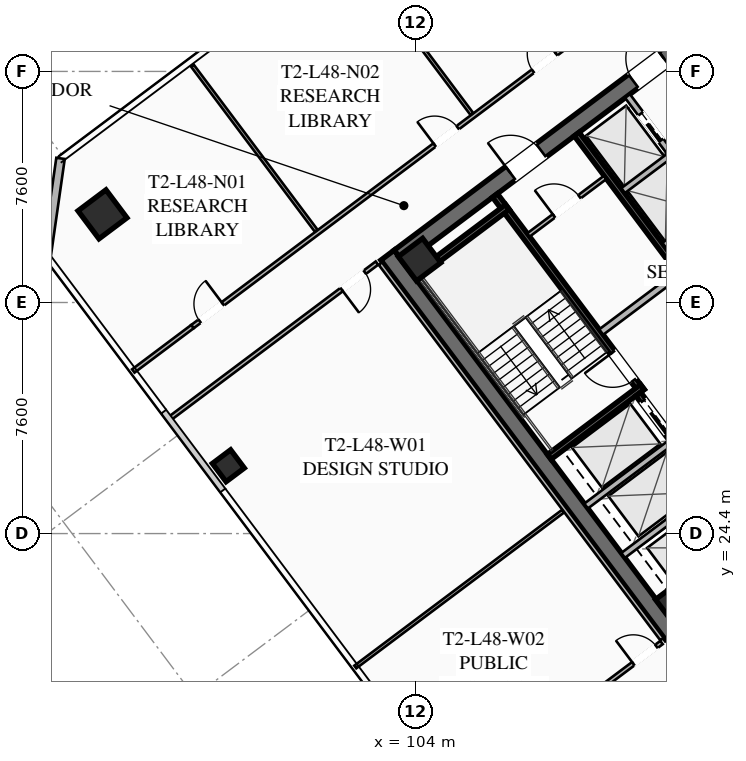
"""IFC4 building model, lengths in metres.
Left out: names, types, materials, properties, quantities, classifications, styles, units other than length and angle.
Written with IfcOpenShell. Run it as: python <this file> out.ifc"""

import sys

from ifc_helpers import new_model, si_unit, direction, frame, frame_2d, origin, origin_2d, place, context, subcontext, project, spatial, rectangle, hollow_rectangle, extrude, element, fill, save


model = new_model("IFC4")
c1 = context("Model", 3, precision=1e-05, world=origin(), true_north=direction((0.0, 1.0)))
c2 = subcontext(c1, "Body", "Model", "MODEL_VIEW")
j1 = project(units=[si_unit("LENGTHUNIT", "METRE"), si_unit("PLANEANGLEUNIT", "RADIAN")], contexts=[c1])
p1 = place(None, origin())
s1 = spatial("IfcSite", under=j1, at=p1, CompositionType="ELEMENT")
p2 = place(p1, origin())
s2 = spatial("IfcBuilding", under=s1, at=p2, CompositionType="ELEMENT")
p3 = place(p2, frame((0.0, 0.0, 178.3)))
s3 = spatial("IfcBuildingStorey", under=s2, at=p3, CompositionType="ELEMENT", Elevation=178.3)
p4 = place(p3, frame((112.436, 21.077, 0.0), z_axis=(0.0, 0.0, 1.0), x_axis=(-0.600005007985, 0.799996243986, 0.0)))
e1 = element("IfcWall", 1, at=p4, inside=s3, PredefinedType="SHEAR", context=c2, shape_type="SweptSolid", body=[
    extrude(rectangle(XDim=15.6, YDim=0.55, at=frame_2d((7.8, 0.0))), origin(), (0.0, 0.0, 1.0), 3.55),
])
p5 = place(p3, frame((103.461, 33.502, 0.0), z_axis=(0.0, 0.0, 1.0), x_axis=(0.799998054672, 0.600002593761, 0.0)))
e2 = element("IfcWall", 2, at=p5, inside=s3, PredefinedType="SHEAR", context=c2, shape_type="SweptSolid", body=[
    extrude(rectangle(XDim=15.06, YDim=0.55, at=frame_2d((7.53, 0.0))), origin(), (0.0, 0.0, 1.0), 3.55),
])
p6 = place(p5, frame((4.58, 0.0, 0.0)))
e3 = element("IfcOpeningElement", 3, at=p6, cuts=e2, PredefinedType="OPENING", context=c2, shape_type="SweptSolid", body=[
    extrude(rectangle(XDim=1.25, YDim=2.25, at=frame_2d((0.625, 1.125))), frame((0.0, 0.285, 0.0), z_axis=(0.0, -1.0, 0.0), x_axis=(1.0, 0.0, 0.0)), (0.0, 0.0, 1.0), 0.57),
])
p7 = place(p5, frame((9.63, 0.0, 0.0)))
e4 = element("IfcOpeningElement", 4, at=p7, cuts=e2, PredefinedType="OPENING", context=c2, shape_type="SweptSolid", body=[
    extrude(rectangle(XDim=1.25, YDim=2.25, at=frame_2d((0.625, 1.125))), frame((0.0, 0.285, 0.0), z_axis=(0.0, -1.0, 0.0), x_axis=(1.0, 0.0, 0.0)), (0.0, 0.0, 1.0), 0.57),
])
for number, where, z_axis, x_axis in (
    (5, (112.59, 22.13, 0.0), (0.0, 0.0, 1.0), (0.8, 0.6, 0.0)),
    (6, (104.13, 33.41, 0.0), (0.0, 0.0, 1.0), (0.8, 0.6, 0.0)),
):
    element("IfcColumn", number, at=place(p3, frame(where, z_axis=z_axis, x_axis=x_axis)), inside=s3, PredefinedType="COLUMN", context=c2, shape_type="SweptSolid", body=[
        extrude(hollow_rectangle(XDim=1.0, YDim=1.0, WallThickness=0.04, at=origin_2d()), origin(), (0.0, 0.0, 1.0), 3.37),
    ])
p8 = place(p3, frame((93.7, 34.9, 0.0), z_axis=(0.0, 0.0, 1.0), x_axis=(0.799999996291, 0.600000004945, 0.0)))
e7 = element("IfcColumn", 7, at=p8, inside=s3, PredefinedType="COLUMN", context=c2, shape_type="SweptSolid", body=[
    extrude(hollow_rectangle(XDim=1.15, YDim=1.15, WallThickness=0.045, at=origin_2d()), origin(), (0.0, 0.0, 1.0), 3.37),
])
p9 = place(p3, frame((97.84, 26.63, 0.0), z_axis=(0.0, 0.0, 1.0), x_axis=(0.799999996291, 0.600000004945, 0.0)))
e8 = element("IfcColumn", 8, at=p9, inside=s3, PredefinedType="COLUMN", context=c2, shape_type="SweptSolid", body=[
    extrude(hollow_rectangle(XDim=0.75, YDim=0.75, WallThickness=0.032, at=origin_2d()), origin(), (0.0, 0.0, 1.0), 3.37),
])
p10 = place(p3, frame((91.86, 33.52, 0.0), z_axis=(0.0, 0.0, 1.0), x_axis=(0.141410847992, 0.989950994782, 0.0)))
e9 = element("IfcWall", 9, at=p10, inside=s3, PredefinedType="SOLIDWALL", context=c2, shape_type="SweptSolid", body=[
    extrude(rectangle(XDim=3.253, YDim=0.28, at=frame_2d((1.626, 0.0))), origin(), (0.0, 0.0, 1.0), 3.37),
])
p11 = place(p3, frame((111.44, 29.08, 0.0), z_axis=(0.0, 0.0, 1.0), x_axis=(-0.59999029481, 0.8000072788, 0.0)))
e10 = element("IfcWall", 10, at=p11, inside=s3, PredefinedType="SHEAR", context=c2, shape_type="SweptSolid", body=[
    extrude(rectangle(XDim=8.05, YDim=0.2, at=frame_2d((4.025, 0.0))), origin(), (0.0, 0.0, 1.0), 3.37),
])
p12 = place(p11, frame((0.45, 0.0, 0.0)))
e11 = element("IfcOpeningElement", 11, at=p12, cuts=e10, PredefinedType="OPENING", context=c2, shape_type="SweptSolid", body=[
    extrude(rectangle(XDim=1.15, YDim=2.2, at=frame_2d((0.575, 1.1))), frame((0.0, 0.11, 0.0), z_axis=(0.0, -1.0, 0.0), x_axis=(1.0, 0.0, 0.0)), (0.0, 0.0, 1.0), 0.22),
])
for number, where, z_axis, x_axis in (
    (12, (108.396, 26.922, 0.0), (0.0, 0.0, 1.0), (0.8, 0.6, 0.0)),
    (13, (103.956, 32.842, 0.0), (0.0, 0.0, 1.0), (0.8, 0.6, 0.0)),
):
    element("IfcWall", number, at=place(p3, frame(where, z_axis=z_axis, x_axis=x_axis)), inside=s3, PredefinedType="SHEAR", context=c2, shape_type="SweptSolid", body=[
        extrude(rectangle(XDim=3.83, YDim=0.2, at=frame_2d((1.915, 0.0))), origin(), (0.0, 0.0, 1.0), 3.37),
    ])
p13 = place(p3, frame((117.998, 25.936, 0.0), z_axis=(0.0, 0.0, 1.0), x_axis=(-0.600002693989, 0.799997979501, 0.0)))
e14 = element("IfcWall", 14, at=p13, inside=s3, PredefinedType="SHEAR", context=c2, shape_type="SweptSolid", body=[
    extrude(rectangle(XDim=14.5, YDim=0.2, at=frame_2d((7.25, 0.0))), origin(), (0.0, 0.0, 1.0), 3.37),
])
p14 = place(p3, frame((110.104, 31.028, 0.0), z_axis=(0.0, 0.0, 1.0), x_axis=(0.800018601094, 0.59997519774, 0.0)))
e15 = element("IfcWall", 15, at=p14, inside=s3, PredefinedType="SOLIDWALL", context=c2, shape_type="SweptSolid", body=[
    extrude(rectangle(XDim=3.15, YDim=0.22, at=frame_2d((1.575, 0.0))), origin(), (0.0, 0.0, 1.0), 2.723),
])
p15 = place(p3, frame((115.19, 23.83, 0.0), z_axis=(0.0, 0.0, 1.0), x_axis=(-0.599993943644, 0.800004542231, 0.0)))
e16 = element("IfcWall", 16, at=p15, inside=s3, PredefinedType="SHEAR", context=c2, shape_type="SweptSolid", body=[
    extrude(rectangle(XDim=6.45, YDim=0.2, at=frame_2d((3.225, 0.0))), origin(), (0.0, 0.0, 1.0), 3.37),
])
p16 = place(p15, frame((4.875, 0.0, 0.0)))
e17 = element("IfcOpeningElement", 17, at=p16, cuts=e16, PredefinedType="OPENING", context=c2, shape_type="SweptSolid", body=[
    extrude(rectangle(XDim=1.3, YDim=2.25, at=frame_2d((0.65, 1.125))), frame((0.0, 0.11, 0.0), z_axis=(0.0, -1.0, 0.0), x_axis=(1.0, 0.0, 0.0)), (0.0, 0.0, 1.0), 0.22),
])
p17 = place(p15, frame((2.875, 0.0, 0.0)))
e18 = element("IfcOpeningElement", 18, at=p17, cuts=e16, PredefinedType="OPENING", context=c2, shape_type="SweptSolid", body=[
    extrude(rectangle(XDim=1.3, YDim=2.25, at=frame_2d((0.65, 1.125))), frame((0.0, 0.11, 0.0), z_axis=(0.0, -1.0, 0.0), x_axis=(1.0, 0.0, 0.0)), (0.0, 0.0, 1.0), 0.22),
])
p18 = place(p15, frame((0.675, 0.0, 0.0)))
e19 = element("IfcOpeningElement", 19, at=p18, cuts=e16, PredefinedType="OPENING", context=c2, shape_type="SweptSolid", body=[
    extrude(rectangle(XDim=1.3, YDim=2.25, at=frame_2d((0.65, 1.125))), frame((0.0, 0.11, 0.0), z_axis=(0.0, -1.0, 0.0), x_axis=(1.0, 0.0, 0.0)), (0.0, 0.0, 1.0), 0.22),
])
for number, where, z_axis, x_axis in (
    (20, (110.826, 23.682, 0.0), (0.0, 0.0, 1.0), (0.8, 0.6, 0.0)),
    (21, (109.608, 25.306, 0.0), (0.0, 0.0, 1.0), (0.8, 0.6, 0.0)),
):
    element("IfcWall", number, at=place(p3, frame(where, z_axis=z_axis, x_axis=x_axis)), inside=s3, PredefinedType="SOLIDWALL", context=c2, shape_type="SweptSolid", body=[
        extrude(rectangle(XDim=3.48, YDim=0.2, at=frame_2d((1.74, 0.0))), origin(), (0.0, 0.0, 1.0), 3.37),
    ])
p19 = place(p3, frame((107.71, 34.22, 0.0), z_axis=(0.0, 0.0, 1.0), x_axis=(0.799981399002, 0.60002480053, 0.0)))
e22 = element("IfcWall", 22, at=p19, inside=s3, PredefinedType="PARTITIONING", context=c2, shape_type="SweptSolid", body=[
    extrude(rectangle(XDim=3.15, YDim=0.135, at=frame_2d((1.575, 0.0))), origin(), (0.0, 0.0, 1.0), 2.723),
])
p20 = place(p19, frame((1.05, 0.0, 0.0)))
e23 = element("IfcOpeningElement", 23, at=p20, cuts=e22, PredefinedType="OPENING", context=c2, shape_type="SweptSolid", body=[
    extrude(rectangle(XDim=1.05, YDim=2.2, at=frame_2d((0.525, 1.1))), frame((0.0, 0.077, 0.0), z_axis=(0.0, -1.0, 0.0), x_axis=(1.0, 0.0, 0.0)), (0.0, 0.0, 1.0), 0.155),
])
p21 = place(p3, frame((115.11, 33.27, 0.0), z_axis=(0.0, 0.0, 1.0), x_axis=(-0.600011322243, 0.799991508192, 0.0)))
e24 = element("IfcWall", 24, at=p21, inside=s3, PredefinedType="SOLIDWALL", context=c2, shape_type="SweptSolid", body=[
    extrude(rectangle(XDim=6.9, YDim=0.2, at=frame_2d((3.45, 0.0))), origin(), (0.0, 0.0, 1.0), 3.37),
])
p22 = place(p21, frame((0.575, 0.0, 0.0)))
e25 = element("IfcOpeningElement", 25, at=p22, cuts=e24, PredefinedType="OPENING", context=c2, shape_type="SweptSolid", body=[
    extrude(rectangle(XDim=1.1, YDim=2.2, at=frame_2d((0.55, 1.1))), frame((0.0, 0.11, 0.0), z_axis=(0.0, -1.0, 0.0), x_axis=(1.0, 0.0, 0.0)), (0.0, 0.0, 1.0), 0.22),
])
p23 = place(p21, frame((2.825, 0.0, 0.0)))
e26 = element("IfcOpeningElement", 26, at=p23, cuts=e24, PredefinedType="OPENING", context=c2, shape_type="SweptSolid", body=[
    extrude(rectangle(XDim=1.1, YDim=2.2, at=frame_2d((0.55, 1.1))), frame((0.0, 0.11, 0.0), z_axis=(0.0, -1.0, 0.0), x_axis=(1.0, 0.0, 0.0)), (0.0, 0.0, 1.0), 0.22),
])
p24 = place(p21, frame((5.075, 0.0, 0.0)))
e27 = element("IfcOpeningElement", 27, at=p24, cuts=e24, PredefinedType="OPENING", context=c2, shape_type="SweptSolid", body=[
    extrude(rectangle(XDim=1.1, YDim=2.2, at=frame_2d((0.55, 1.1))), frame((0.0, 0.11, 0.0), z_axis=(0.0, -1.0, 0.0), x_axis=(1.0, 0.0, 0.0)), (0.0, 0.0, 1.0), 0.22),
])
p25 = place(p3, frame((112.176, 33.882, 0.0), z_axis=(0.0, 0.0, 1.0), x_axis=(0.8, 0.6, 0.0)))
e28 = element("IfcWall", 28, at=p25, inside=s3, PredefinedType="SOLIDWALL", context=c2, shape_type="SweptSolid", body=[
    extrude(rectangle(XDim=1.88, YDim=0.2, at=frame_2d((0.94, 0.0))), origin(), (0.0, 0.0, 1.0), 3.37),
])
p26 = place(p3, frame((110.826, 35.682, 0.0), z_axis=(0.0, 0.0, 1.0), x_axis=(0.799984418148, 0.600020775241, 0.0)))
e29 = element("IfcWall", 29, at=p26, inside=s3, PredefinedType="SOLIDWALL", context=c2, shape_type="SweptSolid", body=[
    extrude(rectangle(XDim=1.88, YDim=0.2, at=frame_2d((0.94, 0.0))), origin(), (0.0, 0.0, 1.0), 3.37),
])
p27 = place(p3, frame((96.658, 31.206, 0.0), z_axis=(0.0, 0.0, 1.0), x_axis=(0.8, 0.6, 0.0)))
e30 = element("IfcWall", 30, at=p27, inside=s3, PredefinedType="PARTITIONING", context=c2, shape_type="SweptSolid", body=[
    extrude(rectangle(XDim=28.7, YDim=0.135, at=frame_2d((14.35, 0.0))), origin(), (0.0, 0.0, 1.0), 2.723),
])
p28 = place(p27, frame((0.3, 0.0, 0.0)))
e31 = element("IfcOpeningElement", 31, at=p28, cuts=e30, PredefinedType="OPENING", context=c2, shape_type="SweptSolid", body=[
    extrude(rectangle(XDim=0.95, YDim=2.05, at=frame_2d((0.475, 1.025))), frame((0.0, 0.077, 0.0), z_axis=(0.0, -1.0, 0.0), x_axis=(1.0, 0.0, 0.0)), (0.0, 0.0, 1.0), 0.155),
])
p29 = place(p27, frame((9.959, 0.0, 0.0)))
e32 = element("IfcOpeningElement", 32, at=p29, cuts=e30, PredefinedType="OPENING", context=c2, shape_type="SweptSolid", body=[
    extrude(rectangle(XDim=0.95, YDim=2.05, at=frame_2d((0.475, 1.025))), frame((0.0, 0.077, 0.0), z_axis=(0.0, -1.0, 0.0), x_axis=(1.0, 0.0, 0.0)), (0.0, 0.0, 1.0), 0.155),
])
p30 = place(p27, frame((14.005, 0.0, 0.0)))
e33 = element("IfcOpeningElement", 33, at=p30, cuts=e30, PredefinedType="OPENING", context=c2, shape_type="SweptSolid", body=[
    extrude(rectangle(XDim=0.95, YDim=2.05, at=frame_2d((0.475, 1.025))), frame((0.0, 0.077, 0.0), z_axis=(0.0, -1.0, 0.0), x_axis=(1.0, 0.0, 0.0)), (0.0, 0.0, 1.0), 0.155),
])
p31 = place(p27, frame((18.049, 0.0, 0.0)))
e34 = element("IfcOpeningElement", 34, at=p31, cuts=e30, PredefinedType="OPENING", context=c2, shape_type="SweptSolid", body=[
    extrude(rectangle(XDim=0.95, YDim=2.05, at=frame_2d((0.475, 1.025))), frame((0.0, 0.077, 0.0), z_axis=(0.0, -1.0, 0.0), x_axis=(1.0, 0.0, 0.0)), (0.0, 0.0, 1.0), 0.155),
])
p32 = place(p27, frame((27.45, 0.0, 0.0)))
e35 = element("IfcOpeningElement", 35, at=p32, cuts=e30, PredefinedType="OPENING", context=c2, shape_type="SweptSolid", body=[
    extrude(rectangle(XDim=0.95, YDim=2.05, at=frame_2d((0.475, 1.025))), frame((0.0, 0.077, 0.0), z_axis=(0.0, -1.0, 0.0), x_axis=(1.0, 0.0, 0.0)), (0.0, 0.0, 1.0), 0.155),
])
p33 = place(p3, frame((94.714, 29.748, 0.0), z_axis=(0.0, 0.0, 1.0), x_axis=(0.799975885537, 0.600032151272, 0.0)))
e36 = element("IfcWall", 36, at=p33, inside=s3, PredefinedType="PARTITIONING", context=c2, shape_type="SweptSolid", body=[
    extrude(rectangle(XDim=2.43, YDim=0.135, at=frame_2d((1.215, 0.0))), origin(), (0.0, 0.0, 1.0), 2.723),
])
p34 = place(p3, frame((100.73, 34.36, 0.0), z_axis=(0.0, 0.0, 1.0), x_axis=(-0.6, 0.8, 0.0)))
e37 = element("IfcWall", 37, at=p34, inside=s3, PredefinedType="PARTITIONING", context=c2, shape_type="SweptSolid", body=[
    extrude(rectangle(XDim=6.78, YDim=0.11, at=frame_2d((3.39, 0.0))), origin(), (0.0, 0.0, 1.0), 2.723),
])
p35 = place(p3, frame((105.85, 38.2, 0.0), z_axis=(0.0, 0.0, 1.0), x_axis=(-0.600005761307, 0.799995678987, 0.0)))
e38 = element("IfcWall", 38, at=p35, inside=s3, PredefinedType="PARTITIONING", context=c2, shape_type="SweptSolid", body=[
    extrude(rectangle(XDim=6.78, YDim=0.11, at=frame_2d((3.39, 0.0))), origin(), (0.0, 0.0, 1.0), 2.723),
])
p36 = place(p3, frame((131.78, 32.21, 0.0), z_axis=(0.0, 0.0, 1.0), x_axis=(-0.8, -0.6, 0.0)))
e39 = element("IfcWall", 39, at=p36, inside=s3, PredefinedType="PARTITIONING", context=c2, shape_type="SweptSolid", body=[
    extrude(rectangle(XDim=28.7, YDim=0.135, at=frame_2d((14.35, 0.0))), origin(), (0.0, 0.0, 1.0), 2.723),
])
p37 = place(p36, frame((27.37, 0.0, 0.0)))
e40 = element("IfcOpeningElement", 40, at=p37, cuts=e39, PredefinedType="OPENING", context=c2, shape_type="SweptSolid", body=[
    extrude(rectangle(XDim=0.95, YDim=2.05, at=frame_2d((0.475, 1.025))), frame((0.0, 0.077, 0.0), z_axis=(0.0, -1.0, 0.0), x_axis=(1.0, 0.0, 0.0)), (0.0, 0.0, 1.0), 0.155),
])
p38 = place(p36, frame((13.592, 0.0, 0.0)))
e41 = element("IfcOpeningElement", 41, at=p38, cuts=e39, PredefinedType="OPENING", context=c2, shape_type="SweptSolid", body=[
    extrude(rectangle(XDim=0.95, YDim=2.05, at=frame_2d((0.475, 1.025))), frame((0.0, 0.077, 0.0), z_axis=(0.0, -1.0, 0.0), x_axis=(1.0, 0.0, 0.0)), (0.0, 0.0, 1.0), 0.155),
])
p39 = place(p36, frame((0.38, 0.0, 0.0)))
e42 = element("IfcOpeningElement", 42, at=p39, cuts=e39, PredefinedType="OPENING", context=c2, shape_type="SweptSolid", body=[
    extrude(rectangle(XDim=0.95, YDim=2.05, at=frame_2d((0.475, 1.025))), frame((0.0, 0.077, 0.0), z_axis=(0.0, -1.0, 0.0), x_axis=(1.0, 0.0, 0.0)), (0.0, 0.0, 1.0), 0.155),
])
p40 = place(p3, frame((112.104, 20.928, 0.0), z_axis=(0.0, 0.0, 1.0), x_axis=(-0.599994940075, 0.800003794918, 0.0)))
e43 = element("IfcWall", 43, at=p40, inside=s3, PredefinedType="PARTITIONING", context=c2, shape_type="SweptSolid", body=[
    extrude(rectangle(XDim=15.44, YDim=0.135, at=frame_2d((7.72, 0.0))), origin(), (0.0, 0.0, 1.0), 2.723),
])
p41 = place(p3, frame((102.728, 33.296, 0.0), z_axis=(0.0, 0.0, 1.0), x_axis=(-0.800013722153, -0.59998170336, 0.0)))
e44 = element("IfcWall", 44, at=p41, inside=s3, PredefinedType="PARTITIONING", context=c2, shape_type="SweptSolid", body=[
    extrude(rectangle(XDim=8.54, YDim=0.135, at=frame_2d((4.27, 0.0))), origin(), (0.0, 0.0, 1.0), 2.723),
])
p42 = place(p41, frame((0.5, 0.0, 0.0)))
e45 = element("IfcOpeningElement", 45, at=p42, cuts=e44, PredefinedType="OPENING", context=c2, shape_type="SweptSolid", body=[
    extrude(rectangle(XDim=0.95, YDim=2.05, at=frame_2d((0.475, 1.025))), frame((0.0, 0.077, 0.0), z_axis=(0.0, -1.0, 0.0), x_axis=(1.0, 0.0, 0.0)), (0.0, 0.0, 1.0), 0.155),
])
p43 = place(p3, frame((105.256, 15.692, 0.0), z_axis=(0.0, 0.0, 1.0), x_axis=(0.799989708052, 0.600013722352, 0.0)))
e46 = element("IfcWall", 46, at=p43, inside=s3, PredefinedType="PARTITIONING", context=c2, shape_type="SweptSolid", body=[
    extrude(rectangle(XDim=8.54, YDim=0.135, at=frame_2d((4.27, 0.0))), origin(), (0.0, 0.0, 1.0), 2.723),
])
p44 = place(p43, frame((7.38, 0.0, 0.0)))
e47 = element("IfcOpeningElement", 47, at=p44, cuts=e46, PredefinedType="OPENING", context=c2, shape_type="SweptSolid", body=[
    extrude(rectangle(XDim=0.95, YDim=2.05, at=frame_2d((0.475, 1.025))), frame((0.0, 0.077, 0.0), z_axis=(0.0, -1.0, 0.0), x_axis=(1.0, 0.0, 0.0)), (0.0, 0.0, 1.0), 0.155),
])
p45 = place(p3, frame((102.016, 20.012, 0.0), z_axis=(0.0, 0.0, 1.0), x_axis=(0.799989708052, 0.600013722352, 0.0)))
e48 = element("IfcWall", 48, at=p45, inside=s3, PredefinedType="PARTITIONING", context=c2, shape_type="SweptSolid", body=[
    extrude(rectangle(XDim=8.54, YDim=0.11, at=frame_2d((4.27, 0.0))), origin(), (0.0, 0.0, 1.0), 2.723),
])
p46 = place(p6, origin())
e49 = element("IfcDoor", 49, at=p46, inside=s3, OperationType="SINGLE_SWING_LEFT", PredefinedType="DOOR", context=c2, shape_type="SweptSolid", body=[
    extrude(rectangle(XDim=1.25, YDim=2.25, at=frame_2d((0.625, 1.125))), frame((0.0, 0.025, 0.0), z_axis=(0.0, -1.0, 0.0), x_axis=(1.0, 0.0, 0.0)), (0.0, 0.0, 1.0), 0.05),
])
fill(e3, e49)
p47 = place(p7, origin())
e50 = element("IfcDoor", 50, at=p47, inside=s3, OperationType="SINGLE_SWING_RIGHT", PredefinedType="DOOR", context=c2, shape_type="SweptSolid", body=[
    extrude(rectangle(XDim=1.25, YDim=2.25, at=frame_2d((0.625, 1.125))), frame((0.0, 0.025, 0.0), z_axis=(0.0, -1.0, 0.0), x_axis=(1.0, 0.0, 0.0)), (0.0, 0.0, 1.0), 0.05),
])
fill(e4, e50)
p48 = place(p12, origin())
e51 = element("IfcDoor", 51, at=p48, inside=s3, OperationType="SINGLE_SWING_RIGHT", PredefinedType="DOOR", context=c2, shape_type="SweptSolid", body=[
    extrude(rectangle(XDim=1.15, YDim=2.2, at=frame_2d((0.575, 1.1))), frame((0.0, 0.025, 0.0), z_axis=(0.0, -1.0, 0.0), x_axis=(1.0, 0.0, 0.0)), (0.0, 0.0, 1.0), 0.05),
])
fill(e11, e51)
p49 = place(p20, origin())
e52 = element("IfcDoor", 52, at=p49, inside=s3, OperationType="SINGLE_SWING_LEFT", PredefinedType="DOOR", context=c2, shape_type="SweptSolid", body=[
    extrude(rectangle(XDim=1.05, YDim=2.2, at=frame_2d((0.525, 1.1))), frame((0.0, 0.025, 0.0), z_axis=(0.0, -1.0, 0.0), x_axis=(1.0, 0.0, 0.0)), (0.0, 0.0, 1.0), 0.05),
])
fill(e23, e52)
p50 = place(p28, origin())
e53 = element("IfcDoor", 53, at=p50, inside=s3, OperationType="SINGLE_SWING_RIGHT", PredefinedType="DOOR", context=c2, shape_type="SweptSolid", body=[
    extrude(rectangle(XDim=0.95, YDim=2.05, at=frame_2d((0.475, 1.025))), frame((0.0, 0.025, 0.0), z_axis=(0.0, -1.0, 0.0), x_axis=(1.0, 0.0, 0.0)), (0.0, 0.0, 1.0), 0.05),
])
fill(e31, e53)
p51 = place(p29, origin())
e54 = element("IfcDoor", 54, at=p51, inside=s3, OperationType="SINGLE_SWING_LEFT", PredefinedType="DOOR", context=c2, shape_type="SweptSolid", body=[
    extrude(rectangle(XDim=0.95, YDim=2.05, at=frame_2d((0.475, 1.025))), frame((0.0, 0.025, 0.0), z_axis=(0.0, -1.0, 0.0), x_axis=(1.0, 0.0, 0.0)), (0.0, 0.0, 1.0), 0.05),
])
fill(e32, e54)
p52 = place(p30, origin())
e55 = element("IfcDoor", 55, at=p52, inside=s3, OperationType="SINGLE_SWING_RIGHT", PredefinedType="DOOR", context=c2, shape_type="SweptSolid", body=[
    extrude(rectangle(XDim=0.95, YDim=2.05, at=frame_2d((0.475, 1.025))), frame((0.0, 0.025, 0.0), z_axis=(0.0, -1.0, 0.0), x_axis=(1.0, 0.0, 0.0)), (0.0, 0.0, 1.0), 0.05),
])
fill(e33, e55)
p53 = place(p42, origin())
e56 = element("IfcDoor", 56, at=p53, inside=s3, OperationType="SINGLE_SWING_RIGHT", PredefinedType="DOOR", context=c2, shape_type="SweptSolid", body=[
    extrude(rectangle(XDim=0.95, YDim=2.05, at=frame_2d((0.475, 1.025))), frame((0.0, 0.025, 0.0), z_axis=(0.0, -1.0, 0.0), x_axis=(1.0, 0.0, 0.0)), (0.0, 0.0, 1.0), 0.05),
])
fill(e45, e56)
p54 = place(p44, origin())
e57 = element("IfcDoor", 57, at=p54, inside=s3, OperationType="SINGLE_SWING_LEFT", PredefinedType="DOOR", context=c2, shape_type="SweptSolid", body=[
    extrude(rectangle(XDim=0.95, YDim=2.05, at=frame_2d((0.475, 1.025))), frame((0.0, 0.025, 0.0), z_axis=(0.0, -1.0, 0.0), x_axis=(1.0, 0.0, 0.0)), (0.0, 0.0, 1.0), 0.05),
])
fill(e47, e57)
p55 = place(p16, origin())
e58 = element("IfcDoor", 58, at=p55, inside=s3, OperationType="SLIDING_TO_LEFT", PredefinedType="DOOR", context=c2, shape_type="SweptSolid", body=[
    extrude(rectangle(XDim=1.3, YDim=2.25, at=frame_2d((0.65, 1.125))), frame((0.0, 0.025, 0.0), z_axis=(0.0, -1.0, 0.0), x_axis=(1.0, 0.0, 0.0)), (0.0, 0.0, 1.0), 0.05),
])
fill(e17, e58)
p56 = place(p24, origin())
e59 = element("IfcDoor", 59, at=p56, inside=s3, OperationType="SLIDING_TO_LEFT", PredefinedType="DOOR", context=c2, shape_type="SweptSolid", body=[
    extrude(rectangle(XDim=1.1, YDim=2.2, at=frame_2d((0.55, 1.1))), frame((0.0, 0.025, 0.0), z_axis=(0.0, -1.0, 0.0), x_axis=(1.0, 0.0, 0.0)), (0.0, 0.0, 1.0), 0.05),
])
fill(e27, e59)
save(model, sys.argv[1])
